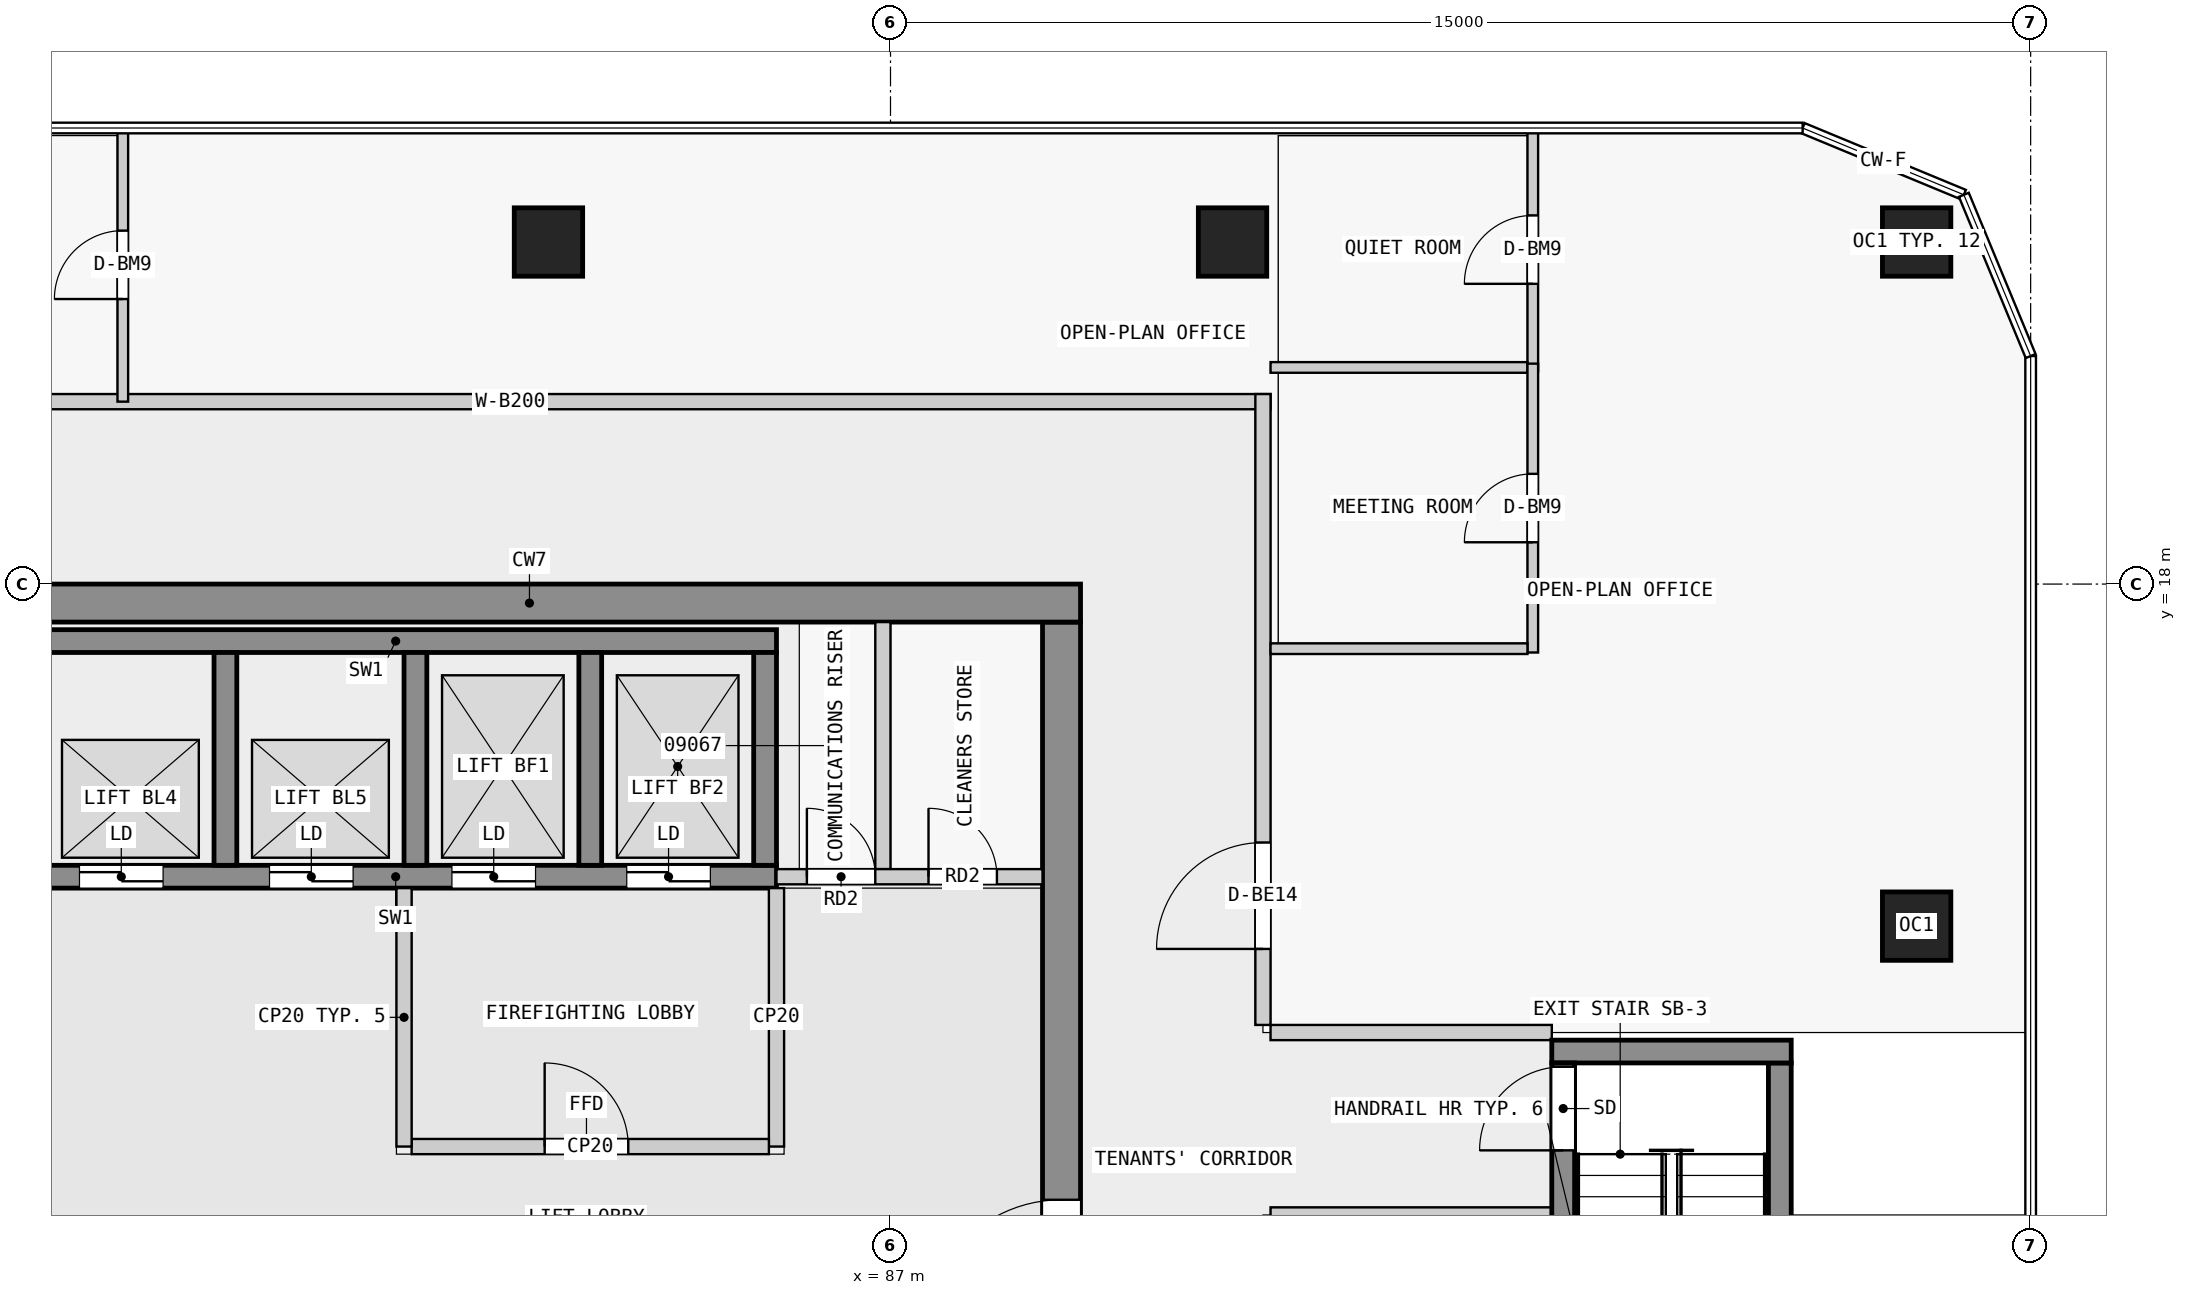
"""IFC4 building model, lengths in metres.
Left out: names, types, materials, properties, quantities, classifications, styles, units other than length and angle.
Written with IfcOpenShell. Run it as: python <this file> out.ifc"""

import sys

from ifc_helpers import new_model, si_unit, direction, frame, frame_2d, origin, origin_2d, place, context, subcontext, project, spatial, rectangle, extrude, element, fill, save


model = new_model("IFC4")
c1 = context("Model", 3, precision=1e-05, world=origin(), true_north=direction((0.0, 1.0)))
c2 = subcontext(c1, "Body", "Model", "MODEL_VIEW")
j1 = project(units=[si_unit("LENGTHUNIT", "METRE"), si_unit("PLANEANGLEUNIT", "RADIAN")], contexts=[c1])
p1 = place(None, origin())
s1 = spatial("IfcSite", under=j1, at=p1, CompositionType="ELEMENT")
p2 = place(p1, origin())
s2 = spatial("IfcBuilding", under=s1, at=p2, CompositionType="ELEMENT")
p3 = place(p2, frame((0.0, 0.0, 40.8)))
s3 = spatial("IfcBuildingStorey", under=s2, at=p3, CompositionType="ELEMENT", Elevation=40.8)
for number, where, z_axis, x_axis in (
    (1, (100.5, 13.5, 0.0), (0.0, 0.0, 1.0), (1.0, 0.0, 0.0)),
    (2, (100.5, 22.5, 0.0), (0.0, 0.0, 1.0), (1.0, 0.0, 0.0)),
    (3, (91.5, 22.5, 0.0), (0.0, 0.0, 1.0), (1.0, 0.0, 0.0)),
    (4, (82.5, 22.5, 0.0), (0.0, 0.0, 1.0), (1.0, 0.0, 0.0)),
):
    element("IfcColumn", number, at=place(p3, frame(where, z_axis=z_axis, x_axis=x_axis)), inside=s3, PredefinedType="COLUMN", context=c2, shape_type="SweptSolid", body=[
        extrude(rectangle(XDim=0.9, YDim=0.9, at=origin_2d()), origin(), (0.0, 0.0, 1.0), 3.5),
    ])
p4 = place(p3, frame((75.0, 17.75, 0.0), z_axis=(0.0, 0.0, 1.0), x_axis=(1.0, 0.0, 0.0)))
e5 = element("IfcWall", 5, at=p4, inside=s3, PredefinedType="SHEAR", context=c2, shape_type="SweptSolid", body=[
    extrude(rectangle(XDim=14.5, YDim=0.5, at=frame_2d((7.25, 0.0))), origin(), (0.0, 0.0, 1.0), 3.25),
])
p5 = place(p3, frame((89.25, 0.5, 0.0), z_axis=(0.0, 0.0, 1.0), x_axis=(0.0, 1.0, 0.0)))
e6 = element("IfcWall", 6, at=p5, inside=s3, PredefinedType="SHEAR", context=c2, shape_type="SweptSolid", body=[
    extrude(rectangle(XDim=17.0, YDim=0.5, at=frame_2d((8.5, 0.0))), origin(), (0.0, 0.0, 1.0), 3.25),
])
p6 = place(p5, frame((7.6, 0.0, 0.0)))
e7 = element("IfcOpeningElement", 7, at=p6, cuts=e6, PredefinedType="OPENING", context=c2, shape_type="SweptSolid", body=[
    extrude(rectangle(XDim=1.8, YDim=2.1, at=frame_2d((0.9, 1.05))), frame((0.0, 0.26, 0.0), z_axis=(0.0, -1.0, 0.0), x_axis=(1.0, 0.0, 0.0)), (0.0, 0.0, 1.0), 0.52),
])
p7 = place(p3, frame((75.48, 17.25, 0.0), z_axis=(0.0, 0.0, 1.0), x_axis=(1.0, 0.0, 0.0)))
e8 = element("IfcWall", 8, at=p7, inside=s3, PredefinedType="SHEAR", context=c2, shape_type="SweptSolid", body=[
    extrude(rectangle(XDim=10.02, YDim=0.3, at=frame_2d((5.01, 0.0))), origin(), (0.0, 0.0, 1.0), 3.25),
])
p8 = place(p3, frame((75.48, 14.15, 0.0), z_axis=(0.0, 0.0, 1.0), x_axis=(1.0, 0.0, 0.0)))
e9 = element("IfcWall", 9, at=p8, inside=s3, PredefinedType="SHEAR", context=c2, shape_type="SweptSolid", body=[
    extrude(rectangle(XDim=10.02, YDim=0.3, at=frame_2d((5.01, 0.0))), origin(), (0.0, 0.0, 1.0), 3.25),
])
p9 = place(p8, frame((0.85, 0.0, 0.0)))
e10 = element("IfcOpeningElement", 10, at=p9, cuts=e9, PredefinedType="OPENING", context=c2, shape_type="SweptSolid", body=[
    extrude(rectangle(XDim=1.1, YDim=2.1, at=frame_2d((0.55, 1.05))), frame((0.0, 0.16, 0.0), z_axis=(0.0, -1.0, 0.0), x_axis=(1.0, 0.0, 0.0)), (0.0, 0.0, 1.0), 0.32),
])
p10 = place(p8, frame((3.35, 0.0, 0.0)))
e11 = element("IfcOpeningElement", 11, at=p10, cuts=e9, PredefinedType="OPENING", context=c2, shape_type="SweptSolid", body=[
    extrude(rectangle(XDim=1.1, YDim=2.1, at=frame_2d((0.55, 1.05))), frame((0.0, 0.16, 0.0), z_axis=(0.0, -1.0, 0.0), x_axis=(1.0, 0.0, 0.0)), (0.0, 0.0, 1.0), 0.32),
])
p11 = place(p8, frame((5.75, 0.0, 0.0)))
e12 = element("IfcOpeningElement", 12, at=p11, cuts=e9, PredefinedType="OPENING", context=c2, shape_type="SweptSolid", body=[
    extrude(rectangle(XDim=1.1, YDim=2.1, at=frame_2d((0.55, 1.05))), frame((0.0, 0.16, 0.0), z_axis=(0.0, -1.0, 0.0), x_axis=(1.0, 0.0, 0.0)), (0.0, 0.0, 1.0), 0.32),
])
p12 = place(p8, frame((8.05, 0.0, 0.0)))
e13 = element("IfcOpeningElement", 13, at=p12, cuts=e9, PredefinedType="OPENING", context=c2, shape_type="SweptSolid", body=[
    extrude(rectangle(XDim=1.1, YDim=2.1, at=frame_2d((0.55, 1.05))), frame((0.0, 0.16, 0.0), z_axis=(0.0, -1.0, 0.0), x_axis=(1.0, 0.0, 0.0)), (0.0, 0.0, 1.0), 0.32),
])
for number, where, z_axis, x_axis in (
    (14, (78.25, 14.3, 0.0), (0.0, 0.0, 1.0), (0.0, 1.0, 0.0)),
    (15, (80.75, 14.3, 0.0), (0.0, 0.0, 1.0), (0.0, 1.0, 0.0)),
    (16, (83.05, 14.3, 0.0), (0.0, 0.0, 1.0), (0.0, 1.0, 0.0)),
    (17, (85.35, 14.3, 0.0), (0.0, 0.0, 1.0), (0.0, 1.0, 0.0)),
):
    element("IfcWall", number, at=place(p3, frame(where, z_axis=z_axis, x_axis=x_axis)), inside=s3, PredefinedType="SHEAR", context=c2, shape_type="SweptSolid", body=[
        extrude(rectangle(XDim=2.8, YDim=0.3, at=frame_2d((1.4, 0.0))), origin(), (0.0, 0.0, 1.0), 3.25),
    ])
p13 = place(p3, frame((95.85, 5.3, 0.0), z_axis=(0.0, 0.0, 1.0), x_axis=(0.0, 1.0, 0.0)))
e18 = element("IfcWall", 18, at=p13, inside=s3, PredefinedType="SHEAR", context=c2, shape_type="SweptSolid", body=[
    extrude(rectangle(XDim=6.4, YDim=0.3, at=frame_2d((3.2, 0.0))), origin(), (0.0, 0.0, 1.0), 3.25),
])
p14 = place(p13, frame((5.25, 0.0, 0.0)))
e19 = element("IfcOpeningElement", 19, at=p14, cuts=e18, PredefinedType="OPENING", context=c2, shape_type="SweptSolid", body=[
    extrude(rectangle(XDim=1.1, YDim=2.1, at=frame_2d((0.55, 1.05))), frame((0.0, 0.16, 0.0), z_axis=(0.0, -1.0, 0.0), x_axis=(1.0, 0.0, 0.0)), (0.0, 0.0, 1.0), 0.32),
])
p15 = place(p3, frame((98.7, 5.3, 0.0), z_axis=(0.0, 0.0, 1.0), x_axis=(0.0, 1.0, 0.0)))
e20 = element("IfcWall", 20, at=p15, inside=s3, PredefinedType="SHEAR", context=c2, shape_type="SweptSolid", body=[
    extrude(rectangle(XDim=6.4, YDim=0.3, at=frame_2d((3.2, 0.0))), origin(), (0.0, 0.0, 1.0), 3.25),
])
p16 = place(p3, frame((95.7, 11.85, 0.0), z_axis=(0.0, 0.0, 1.0), x_axis=(1.0, 0.0, 0.0)))
e21 = element("IfcWall", 21, at=p16, inside=s3, PredefinedType="SHEAR", context=c2, shape_type="SweptSolid", body=[
    extrude(rectangle(XDim=3.15, YDim=0.3, at=frame_2d((1.575, 0.0))), origin(), (0.0, 0.0, 1.0), 3.25),
])
p17 = place(p3, frame((80.6, 10.6, 0.0), z_axis=(0.0, 0.0, 1.0), x_axis=(0.0, 1.0, 0.0)))
e22 = element("IfcWall", 22, at=p17, inside=s3, PredefinedType="PARTITIONING", context=c2, shape_type="SweptSolid", body=[
    extrude(rectangle(XDim=3.4, YDim=0.2, at=frame_2d((1.7, 0.0))), origin(), (0.0, 0.0, 1.0), 3.25),
])
p18 = place(p3, frame((80.7, 10.6, 0.0), z_axis=(0.0, 0.0, 1.0), x_axis=(1.0, 0.0, 0.0)))
e23 = element("IfcWall", 23, at=p18, inside=s3, PredefinedType="PARTITIONING", context=c2, shape_type="SweptSolid", body=[
    extrude(rectangle(XDim=4.7, YDim=0.2, at=frame_2d((2.35, 0.0))), origin(), (0.0, 0.0, 1.0), 3.25),
])
p19 = place(p18, frame((1.75, 0.0, 0.0)))
e24 = element("IfcOpeningElement", 24, at=p19, cuts=e23, PredefinedType="OPENING", context=c2, shape_type="SweptSolid", body=[
    extrude(rectangle(XDim=1.1, YDim=2.1, at=frame_2d((0.55, 1.05))), frame((0.0, 0.11, 0.0), z_axis=(0.0, -1.0, 0.0), x_axis=(1.0, 0.0, 0.0)), (0.0, 0.0, 1.0), 0.22),
])
p20 = place(p3, frame((85.5, 10.6, 0.0), z_axis=(0.0, 0.0, 1.0), x_axis=(0.0, 1.0, 0.0)))
e25 = element("IfcWall", 25, at=p20, inside=s3, PredefinedType="PARTITIONING", context=c2, shape_type="SweptSolid", body=[
    extrude(rectangle(XDim=3.4, YDim=0.2, at=frame_2d((1.7, 0.0))), origin(), (0.0, 0.0, 1.0), 3.25),
])
p21 = place(p3, frame((85.5, 14.15, 0.0), z_axis=(0.0, 0.0, 1.0), x_axis=(1.0, 0.0, 0.0)))
e26 = element("IfcWall", 26, at=p21, inside=s3, PredefinedType="PARTITIONING", context=c2, shape_type="SweptSolid", body=[
    extrude(rectangle(XDim=3.5, YDim=0.2, at=frame_2d((1.75, 0.0))), origin(), (0.0, 0.0, 1.0), 3.25),
])
p22 = place(p21, frame((0.4, 0.0, 0.0)))
e27 = element("IfcOpeningElement", 27, at=p22, cuts=e26, PredefinedType="OPENING", context=c2, shape_type="SweptSolid", body=[
    extrude(rectangle(XDim=0.9, YDim=2.1, at=frame_2d((0.45, 1.05))), frame((0.0, 0.11, 0.0), z_axis=(0.0, -1.0, 0.0), x_axis=(1.0, 0.0, 0.0)), (0.0, 0.0, 1.0), 0.22),
])
p23 = place(p21, frame((2.0, 0.0, 0.0)))
e28 = element("IfcOpeningElement", 28, at=p23, cuts=e26, PredefinedType="OPENING", context=c2, shape_type="SweptSolid", body=[
    extrude(rectangle(XDim=0.9, YDim=2.1, at=frame_2d((0.45, 1.05))), frame((0.0, 0.11, 0.0), z_axis=(0.0, -1.0, 0.0), x_axis=(1.0, 0.0, 0.0)), (0.0, 0.0, 1.0), 0.22),
])
p24 = place(p3, frame((86.9, 14.25, 0.0), z_axis=(0.0, 0.0, 1.0), x_axis=(0.0, 1.0, 0.0)))
e29 = element("IfcWall", 29, at=p24, inside=s3, PredefinedType="PARTITIONING", context=c2, shape_type="SweptSolid", body=[
    extrude(rectangle(XDim=3.25, YDim=0.2, at=frame_2d((1.625, 0.0))), origin(), (0.0, 0.0, 1.0), 3.25),
])
p25 = place(p3, frame((72.0, 20.4, 0.0), z_axis=(0.0, 0.0, 1.0), x_axis=(1.0, 0.0, 0.0)))
e30 = element("IfcWall", 30, at=p25, inside=s3, PredefinedType="PARTITIONING", context=c2, shape_type="SweptSolid", body=[
    extrude(rectangle(XDim=20.0, YDim=0.2, at=frame_2d((10.0, 0.0))), origin(), (0.0, 0.0, 1.0), 3.25),
])
p26 = place(p3, frame((91.9, 12.2, 0.0), z_axis=(0.0, 0.0, 1.0), x_axis=(0.0, 1.0, 0.0)))
e31 = element("IfcWall", 31, at=p26, inside=s3, PredefinedType="PARTITIONING", context=c2, shape_type="SweptSolid", body=[
    extrude(rectangle(XDim=8.3, YDim=0.2, at=frame_2d((4.15, 0.0))), origin(), (0.0, 0.0, 1.0), 3.25),
])
p27 = place(p26, frame((1.0, 0.0, 0.0)))
e32 = element("IfcOpeningElement", 32, at=p27, cuts=e31, PredefinedType="OPENING", context=c2, shape_type="SweptSolid", body=[
    extrude(rectangle(XDim=1.4, YDim=2.4, at=frame_2d((0.7, 1.2))), frame((0.0, 0.11, 0.0), z_axis=(0.0, -1.0, 0.0), x_axis=(1.0, 0.0, 0.0)), (0.0, 0.0, 1.0), 0.22),
])
for number, where, z_axis, x_axis in (
    (33, (92.0, 9.7, 0.0), (0.0, 0.0, 1.0), (1.0, 0.0, 0.0)),
    (34, (92.0, 12.1, 0.0), (0.0, 0.0, 1.0), (1.0, 0.0, 0.0)),
):
    element("IfcWall", number, at=place(p3, frame(where, z_axis=z_axis, x_axis=x_axis)), inside=s3, PredefinedType="PARTITIONING", context=c2, shape_type="SweptSolid", body=[
        extrude(rectangle(XDim=3.7, YDim=0.2, at=frame_2d((1.85, 0.0))), origin(), (0.0, 0.0, 1.0), 3.25),
    ])
p28 = place(p3, frame((95.45, 20.8, 0.0), z_axis=(0.0, 0.0, 1.0), x_axis=(0.0, 1.0, 0.0)))
e35 = element("IfcWall", 35, at=p28, inside=s3, PredefinedType="PARTITIONING", context=c2, shape_type="SweptSolid", body=[
    extrude(rectangle(XDim=3.2, YDim=0.14, at=frame_2d((1.6, 0.0))), origin(), (0.0, 0.0, 1.0), 3.25),
])
p29 = place(p28, frame((1.15, 0.0, 0.0)))
e36 = element("IfcOpeningElement", 36, at=p29, cuts=e35, PredefinedType="OPENING", context=c2, shape_type="SweptSolid", body=[
    extrude(rectangle(XDim=0.9, YDim=2.4, at=frame_2d((0.45, 1.2))), frame((0.0, 0.08, 0.0), z_axis=(0.0, -1.0, 0.0), x_axis=(1.0, 0.0, 0.0)), (0.0, 0.0, 1.0), 0.16),
])
p30 = place(p3, frame((92.0, 20.85, 0.0), z_axis=(0.0, 0.0, 1.0), x_axis=(1.0, 0.0, 0.0)))
e37 = element("IfcWall", 37, at=p30, inside=s3, PredefinedType="PARTITIONING", context=c2, shape_type="SweptSolid", body=[
    extrude(rectangle(XDim=3.38, YDim=0.14, at=frame_2d((1.69, 0.0))), origin(), (0.0, 0.0, 1.0), 3.25),
])
p31 = place(p3, frame((95.45, 17.1, 0.0), z_axis=(0.0, 0.0, 1.0), x_axis=(0.0, 1.0, 0.0)))
e38 = element("IfcWall", 38, at=p31, inside=s3, PredefinedType="PARTITIONING", context=c2, shape_type="SweptSolid", body=[
    extrude(rectangle(XDim=3.8, YDim=0.14, at=frame_2d((1.9, 0.0))), origin(), (0.0, 0.0, 1.0), 3.25),
])
p32 = place(p31, frame((1.45, 0.0, 0.0)))
e39 = element("IfcOpeningElement", 39, at=p32, cuts=e38, PredefinedType="OPENING", context=c2, shape_type="SweptSolid", body=[
    extrude(rectangle(XDim=0.9, YDim=2.4, at=frame_2d((0.45, 1.2))), frame((0.0, 0.08, 0.0), z_axis=(0.0, -1.0, 0.0), x_axis=(1.0, 0.0, 0.0)), (0.0, 0.0, 1.0), 0.16),
])
p33 = place(p3, frame((92.0, 17.15, 0.0), z_axis=(0.0, 0.0, 1.0), x_axis=(1.0, 0.0, 0.0)))
e40 = element("IfcWall", 40, at=p33, inside=s3, PredefinedType="PARTITIONING", context=c2, shape_type="SweptSolid", body=[
    extrude(rectangle(XDim=3.38, YDim=0.14, at=frame_2d((1.69, 0.0))), origin(), (0.0, 0.0, 1.0), 3.25),
])
p34 = place(p3, frame((76.9, 20.4, 0.0), z_axis=(0.0, 0.0, 1.0), x_axis=(0.0, 1.0, 0.0)))
e41 = element("IfcWall", 41, at=p34, inside=s3, PredefinedType="PARTITIONING", context=c2, shape_type="SweptSolid", body=[
    extrude(rectangle(XDim=3.6, YDim=0.14, at=frame_2d((1.8, 0.0))), origin(), (0.0, 0.0, 1.0), 3.25),
])
p35 = place(p34, frame((1.35, 0.0, 0.0)))
e42 = element("IfcOpeningElement", 42, at=p35, cuts=e41, PredefinedType="OPENING", context=c2, shape_type="SweptSolid", body=[
    extrude(rectangle(XDim=0.9, YDim=2.4, at=frame_2d((0.45, 1.2))), frame((0.0, 0.08, 0.0), z_axis=(0.0, -1.0, 0.0), x_axis=(1.0, 0.0, 0.0)), (0.0, 0.0, 1.0), 0.16),
])
p36 = place(p19, origin())
e43 = element("IfcDoor", 43, at=p36, inside=s3, OperationType="SINGLE_SWING_LEFT", PredefinedType="DOOR", context=c2, shape_type="SweptSolid", body=[
    extrude(rectangle(XDim=1.1, YDim=2.1, at=frame_2d((0.55, 1.05))), frame((0.0, 0.025, 0.0), z_axis=(0.0, -1.0, 0.0), x_axis=(1.0, 0.0, 0.0)), (0.0, 0.0, 1.0), 0.05),
])
fill(e24, e43)
p37 = place(p9, origin())
e44 = element("IfcDoor", 44, at=p37, inside=s3, OperationType="DOUBLE_DOOR_SLIDING", PredefinedType="DOOR", context=c2, shape_type="SweptSolid", body=[
    extrude(rectangle(XDim=1.1, YDim=2.1, at=frame_2d((0.55, 1.05))), frame((0.0, 0.025, 0.0), z_axis=(0.0, -1.0, 0.0), x_axis=(1.0, 0.0, 0.0)), (0.0, 0.0, 1.0), 0.05),
])
fill(e10, e44)
p38 = place(p10, origin())
e45 = element("IfcDoor", 45, at=p38, inside=s3, OperationType="DOUBLE_DOOR_SLIDING", PredefinedType="DOOR", context=c2, shape_type="SweptSolid", body=[
    extrude(rectangle(XDim=1.1, YDim=2.1, at=frame_2d((0.55, 1.05))), frame((0.0, 0.025, 0.0), z_axis=(0.0, -1.0, 0.0), x_axis=(1.0, 0.0, 0.0)), (0.0, 0.0, 1.0), 0.05),
])
fill(e11, e45)
p39 = place(p11, origin())
e46 = element("IfcDoor", 46, at=p39, inside=s3, OperationType="DOUBLE_DOOR_SLIDING", PredefinedType="DOOR", context=c2, shape_type="SweptSolid", body=[
    extrude(rectangle(XDim=1.1, YDim=2.1, at=frame_2d((0.55, 1.05))), frame((0.0, 0.025, 0.0), z_axis=(0.0, -1.0, 0.0), x_axis=(1.0, 0.0, 0.0)), (0.0, 0.0, 1.0), 0.05),
])
fill(e12, e46)
p40 = place(p12, origin())
e47 = element("IfcDoor", 47, at=p40, inside=s3, OperationType="DOUBLE_DOOR_SLIDING", PredefinedType="DOOR", context=c2, shape_type="SweptSolid", body=[
    extrude(rectangle(XDim=1.1, YDim=2.1, at=frame_2d((0.55, 1.05))), frame((0.0, 0.025, 0.0), z_axis=(0.0, -1.0, 0.0), x_axis=(1.0, 0.0, 0.0)), (0.0, 0.0, 1.0), 0.05),
])
fill(e13, e47)
p41 = place(p14, origin())
e48 = element("IfcDoor", 48, at=p41, inside=s3, OperationType="SINGLE_SWING_LEFT", PredefinedType="DOOR", context=c2, shape_type="SweptSolid", body=[
    extrude(rectangle(XDim=1.1, YDim=2.1, at=frame_2d((0.55, 1.05))), frame((0.0, 0.025, 0.0), z_axis=(0.0, -1.0, 0.0), x_axis=(1.0, 0.0, 0.0)), (0.0, 0.0, 1.0), 0.05),
])
fill(e19, e48)
p42 = place(p6, origin())
e49 = element("IfcDoor", 49, at=p42, inside=s3, OperationType="DOUBLE_DOOR_SINGLE_SWING", PredefinedType="DOOR", context=c2, shape_type="SweptSolid", body=[
    extrude(rectangle(XDim=1.8, YDim=2.1, at=frame_2d((0.9, 1.05))), frame((0.0, 0.025, 0.0), z_axis=(0.0, -1.0, 0.0), x_axis=(1.0, 0.0, 0.0)), (0.0, 0.0, 1.0), 0.05),
])
fill(e7, e49)
p43 = place(p22, origin())
e50 = element("IfcDoor", 50, at=p43, inside=s3, OperationType="SINGLE_SWING_LEFT", PredefinedType="DOOR", context=c2, shape_type="SweptSolid", body=[
    extrude(rectangle(XDim=0.9, YDim=2.1, at=frame_2d((0.45, 1.05))), frame((0.0, 0.025, 0.0), z_axis=(0.0, -1.0, 0.0), x_axis=(1.0, 0.0, 0.0)), (0.0, 0.0, 1.0), 0.05),
])
fill(e27, e50)
p44 = place(p23, origin())
e51 = element("IfcDoor", 51, at=p44, inside=s3, OperationType="SINGLE_SWING_LEFT", PredefinedType="DOOR", context=c2, shape_type="SweptSolid", body=[
    extrude(rectangle(XDim=0.9, YDim=2.1, at=frame_2d((0.45, 1.05))), frame((0.0, 0.025, 0.0), z_axis=(0.0, -1.0, 0.0), x_axis=(1.0, 0.0, 0.0)), (0.0, 0.0, 1.0), 0.05),
])
fill(e28, e51)
p45 = place(p27, origin())
e52 = element("IfcDoor", 52, at=p45, inside=s3, OperationType="DOUBLE_DOOR_SINGLE_SWING", PredefinedType="DOOR", context=c2, shape_type="SweptSolid", body=[
    extrude(rectangle(XDim=1.4, YDim=2.4, at=frame_2d((0.7, 1.2))), frame((0.0, 0.025, 0.0), z_axis=(0.0, -1.0, 0.0), x_axis=(1.0, 0.0, 0.0)), (0.0, 0.0, 1.0), 0.05),
])
fill(e32, e52)
p46 = place(p29, origin())
e53 = element("IfcDoor", 53, at=p46, inside=s3, OperationType="SINGLE_SWING_LEFT", PredefinedType="DOOR", context=c2, shape_type="SweptSolid", body=[
    extrude(rectangle(XDim=0.9, YDim=2.4, at=frame_2d((0.45, 1.2))), frame((0.0, 0.025, 0.0), z_axis=(0.0, -1.0, 0.0), x_axis=(1.0, 0.0, 0.0)), (0.0, 0.0, 1.0), 0.05),
])
fill(e36, e53)
p47 = place(p32, origin())
e54 = element("IfcDoor", 54, at=p47, inside=s3, OperationType="SINGLE_SWING_LEFT", PredefinedType="DOOR", context=c2, shape_type="SweptSolid", body=[
    extrude(rectangle(XDim=0.9, YDim=2.4, at=frame_2d((0.45, 1.2))), frame((0.0, 0.025, 0.0), z_axis=(0.0, -1.0, 0.0), x_axis=(1.0, 0.0, 0.0)), (0.0, 0.0, 1.0), 0.05),
])
fill(e39, e54)
p48 = place(p35, origin())
e55 = element("IfcDoor", 55, at=p48, inside=s3, OperationType="SINGLE_SWING_LEFT", PredefinedType="DOOR", context=c2, shape_type="SweptSolid", body=[
    extrude(rectangle(XDim=0.9, YDim=2.4, at=frame_2d((0.45, 1.2))), frame((0.0, 0.025, 0.0), z_axis=(0.0, -1.0, 0.0), x_axis=(1.0, 0.0, 0.0)), (0.0, 0.0, 1.0), 0.05),
])
fill(e42, e55)
save(model, sys.argv[1])
